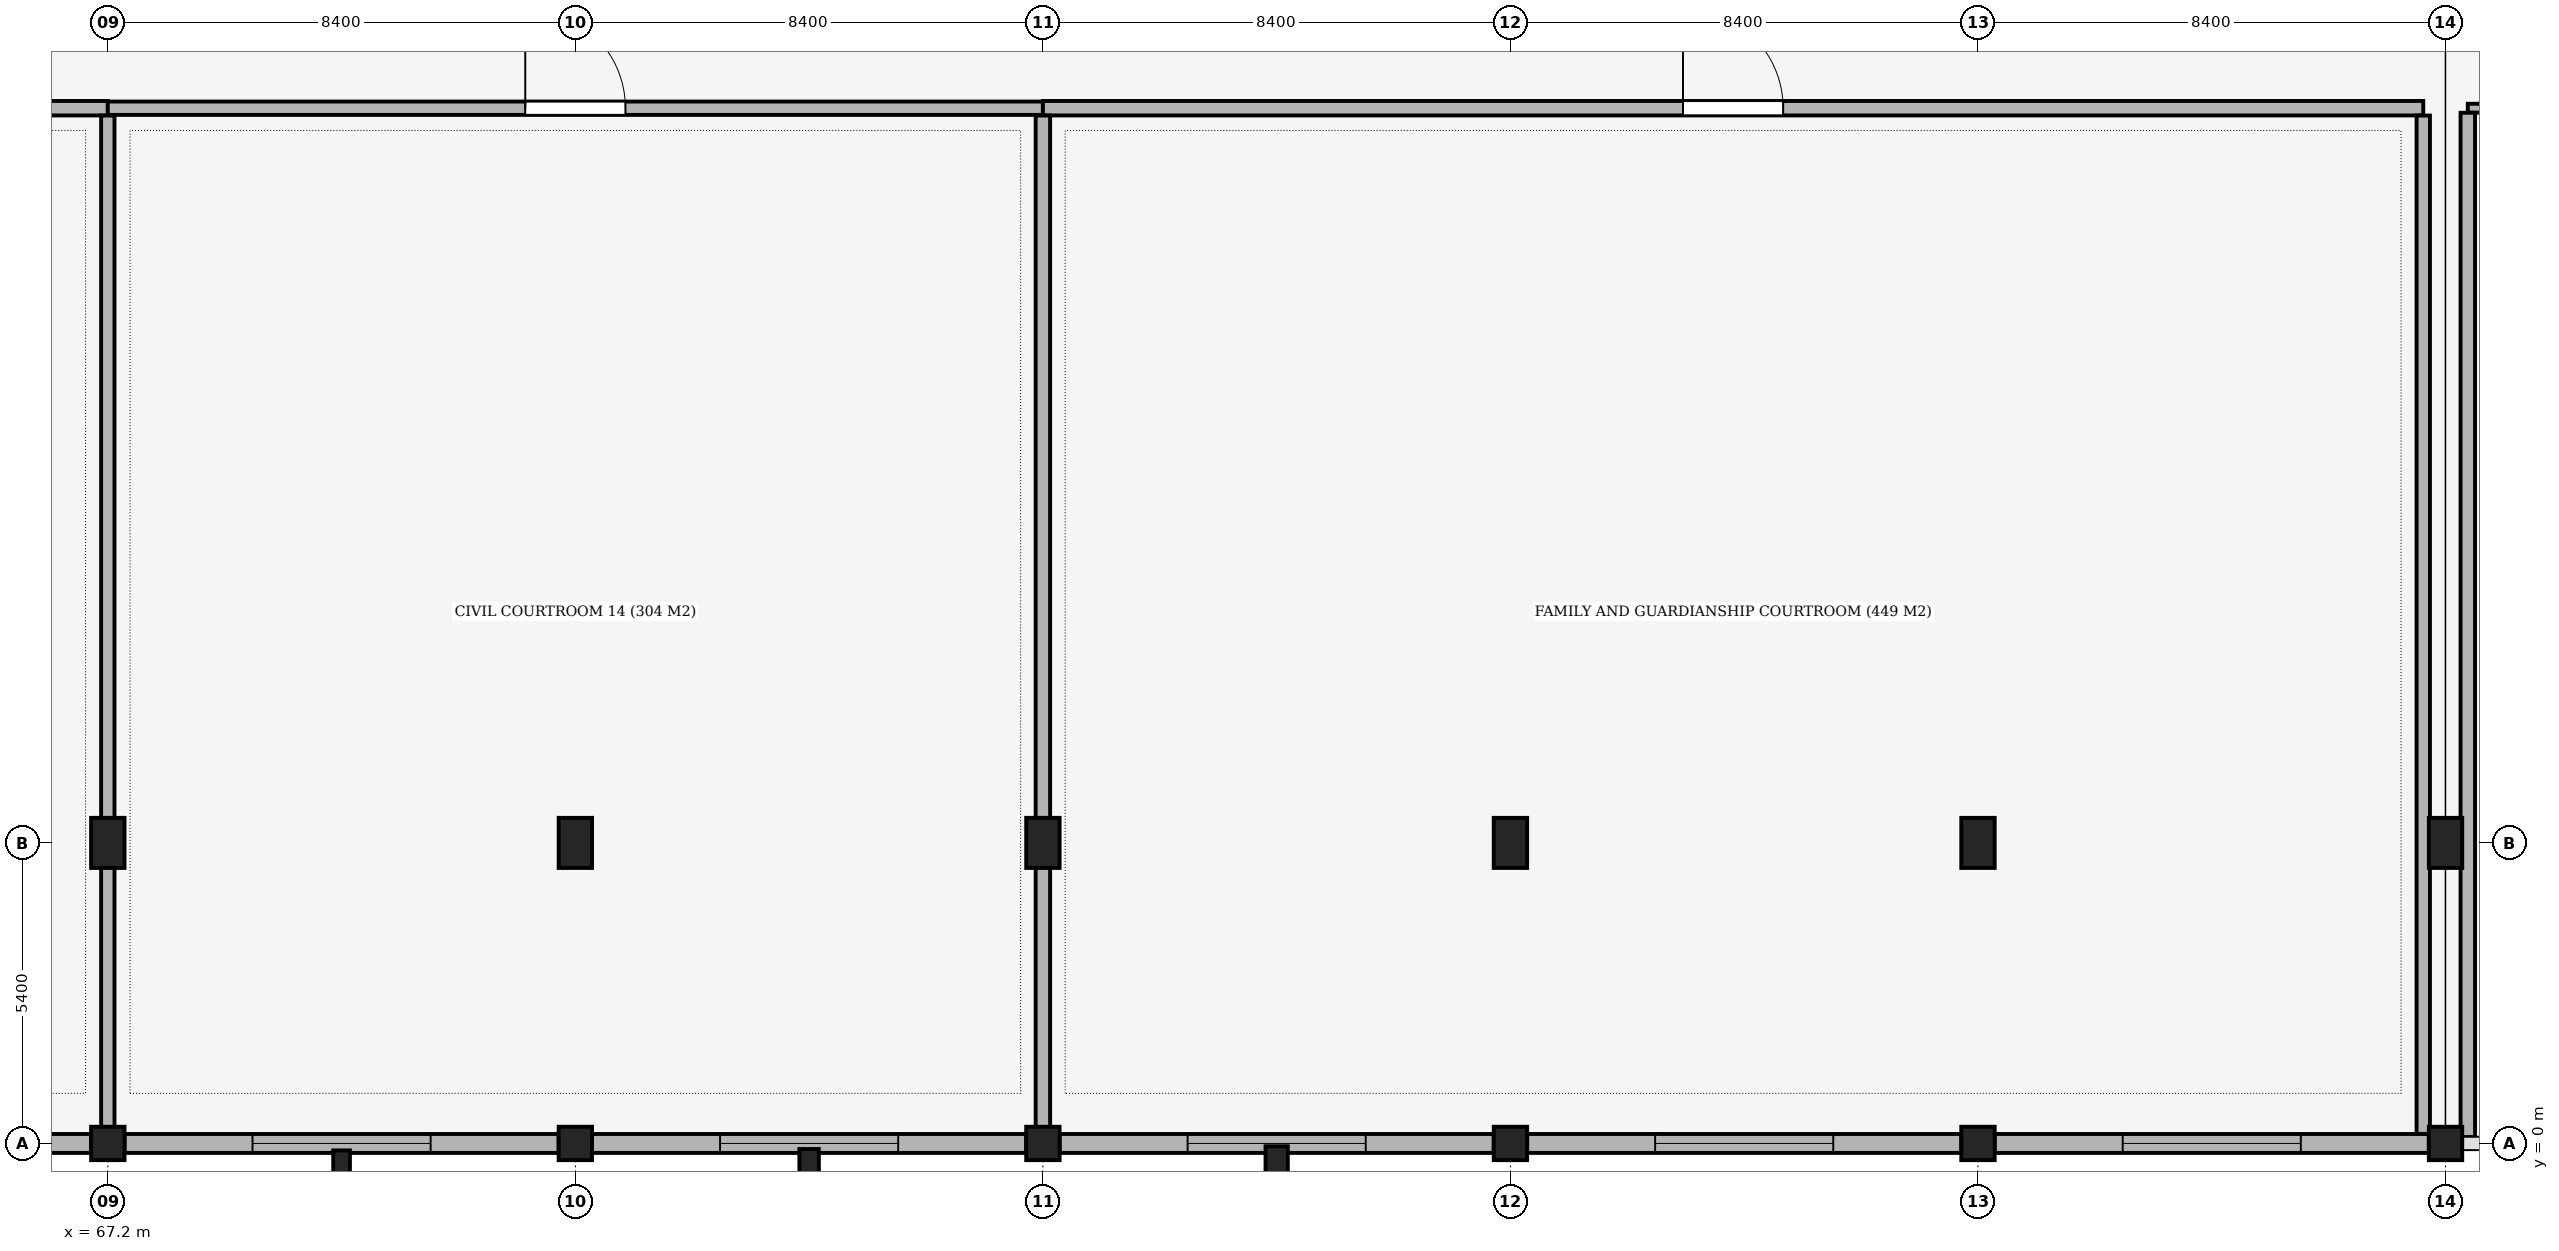
"""IFC4 building model, lengths in metres.
Left out: names, types, materials, properties, quantities, classifications, styles, units other than length and angle.
Written with IfcOpenShell. Run it as: python <this file> out.ifc"""

import sys

from ifc_helpers import new_model, si_unit, direction, frame, frame_2d, origin, origin_2d, place, context, subcontext, project, spatial, rectangle, extrude, element, fill, save


model = new_model("IFC4")
c1 = context("Model", 3, precision=1e-05, world=origin(), true_north=direction((0.0, 1.0)))
c2 = subcontext(c1, "Body", "Model", "MODEL_VIEW")
j1 = project(units=[si_unit("LENGTHUNIT", "METRE"), si_unit("PLANEANGLEUNIT", "RADIAN")], contexts=[c1])
p1 = place(None, origin())
s1 = spatial("IfcSite", under=j1, at=p1, CompositionType="ELEMENT")
p2 = place(p1, origin())
s2 = spatial("IfcBuilding", under=s1, at=p2, CompositionType="ELEMENT")
p3 = place(p2, frame((0.0, 0.0, 10.2)))
s3 = spatial("IfcBuildingStorey", under=s2, at=p3, CompositionType="ELEMENT", Elevation=10.2)
p4 = place(p3, frame((67.2, 0.0, 0.0), z_axis=(0.0, 0.0, 1.0), x_axis=(1.0, 0.0, 0.0)))
e1 = element("IfcColumn", 1, at=p4, inside=s3, PredefinedType="COLUMN", context=c2, shape_type="SweptSolid", body=[
    extrude(rectangle(XDim=0.6, YDim=0.6, at=origin_2d()), origin(), (0.0, 0.0, 1.0), 5.1),
])
p5 = place(p3, frame((67.2, 5.4, 0.0), z_axis=(0.0, 0.0, 1.0), x_axis=(1.0, 0.0, 0.0)))
e2 = element("IfcColumn", 2, at=p5, inside=s3, PredefinedType="COLUMN", context=c2, shape_type="SweptSolid", body=[
    extrude(rectangle(XDim=0.6, YDim=0.9, at=origin_2d()), origin(), (0.0, 0.0, 1.0), 5.1),
])
p6 = place(p3, frame((75.6, 0.0, 0.0), z_axis=(0.0, 0.0, 1.0), x_axis=(1.0, 0.0, 0.0)))
e3 = element("IfcColumn", 3, at=p6, inside=s3, PredefinedType="COLUMN", context=c2, shape_type="SweptSolid", body=[
    extrude(rectangle(XDim=0.6, YDim=0.6, at=origin_2d()), origin(), (0.0, 0.0, 1.0), 5.1),
])
p7 = place(p3, frame((75.6, 5.4, 0.0), z_axis=(0.0, 0.0, 1.0), x_axis=(1.0, 0.0, 0.0)))
e4 = element("IfcColumn", 4, at=p7, inside=s3, PredefinedType="COLUMN", context=c2, shape_type="SweptSolid", body=[
    extrude(rectangle(XDim=0.6, YDim=0.9, at=origin_2d()), origin(), (0.0, 0.0, 1.0), 5.1),
])
p8 = place(p3, frame((84.0, 0.0, 0.0), z_axis=(0.0, 0.0, 1.0), x_axis=(1.0, 0.0, 0.0)))
e5 = element("IfcColumn", 5, at=p8, inside=s3, PredefinedType="COLUMN", context=c2, shape_type="SweptSolid", body=[
    extrude(rectangle(XDim=0.6, YDim=0.6, at=origin_2d()), origin(), (0.0, 0.0, 1.0), 5.1),
])
p9 = place(p3, frame((84.0, 5.4, 0.0), z_axis=(0.0, 0.0, 1.0), x_axis=(1.0, 0.0, 0.0)))
e6 = element("IfcColumn", 6, at=p9, inside=s3, PredefinedType="COLUMN", context=c2, shape_type="SweptSolid", body=[
    extrude(rectangle(XDim=0.6, YDim=0.9, at=origin_2d()), origin(), (0.0, 0.0, 1.0), 5.1),
])
p10 = place(p3, frame((92.4, 0.0, 0.0), z_axis=(0.0, 0.0, 1.0), x_axis=(1.0, 0.0, 0.0)))
e7 = element("IfcColumn", 7, at=p10, inside=s3, PredefinedType="COLUMN", context=c2, shape_type="SweptSolid", body=[
    extrude(rectangle(XDim=0.6, YDim=0.6, at=origin_2d()), origin(), (0.0, 0.0, 1.0), 5.1),
])
p11 = place(p3, frame((92.4, 5.4, 0.0), z_axis=(0.0, 0.0, 1.0), x_axis=(1.0, 0.0, 0.0)))
e8 = element("IfcColumn", 8, at=p11, inside=s3, PredefinedType="COLUMN", context=c2, shape_type="SweptSolid", body=[
    extrude(rectangle(XDim=0.6, YDim=0.9, at=origin_2d()), origin(), (0.0, 0.0, 1.0), 5.1),
])
p12 = place(p3, frame((100.8, 0.0, 0.0), z_axis=(0.0, 0.0, 1.0), x_axis=(1.0, 0.0, 0.0)))
e9 = element("IfcColumn", 9, at=p12, inside=s3, PredefinedType="COLUMN", context=c2, shape_type="SweptSolid", body=[
    extrude(rectangle(XDim=0.6, YDim=0.6, at=origin_2d()), origin(), (0.0, 0.0, 1.0), 5.1),
])
p13 = place(p3, frame((100.8, 5.4, 0.0), z_axis=(0.0, 0.0, 1.0), x_axis=(1.0, 0.0, 0.0)))
e10 = element("IfcColumn", 10, at=p13, inside=s3, PredefinedType="COLUMN", context=c2, shape_type="SweptSolid", body=[
    extrude(rectangle(XDim=0.6, YDim=0.9, at=origin_2d()), origin(), (0.0, 0.0, 1.0), 5.1),
])
p14 = place(p3, frame((109.2, 0.0, 0.0), z_axis=(0.0, 0.0, 1.0), x_axis=(1.0, 0.0, 0.0)))
e11 = element("IfcColumn", 11, at=p14, inside=s3, PredefinedType="COLUMN", context=c2, shape_type="SweptSolid", body=[
    extrude(rectangle(XDim=0.6, YDim=0.6, at=origin_2d()), origin(), (0.0, 0.0, 1.0), 5.1),
])
p15 = place(p3, frame((109.2, 5.4, 0.0), z_axis=(0.0, 0.0, 1.0), x_axis=(1.0, 0.0, 0.0)))
e12 = element("IfcColumn", 12, at=p15, inside=s3, PredefinedType="COLUMN", context=c2, shape_type="SweptSolid", body=[
    extrude(rectangle(XDim=0.6, YDim=0.9, at=origin_2d()), origin(), (0.0, 0.0, 1.0), 5.1),
])
p16 = place(p3, frame((71.4, -0.35, 0.0), z_axis=(0.0, 0.0, 1.0), x_axis=(1.0, 0.0, 0.0)))
e13 = element("IfcColumn", 13, at=p16, inside=s3, PredefinedType="PILASTER", context=c2, shape_type="SweptSolid", body=[
    extrude(rectangle(XDim=0.3, YDim=0.45, at=origin_2d()), origin(), (0.0, 0.0, 1.0), 5.1),
])
p17 = place(p3, frame((79.8, -0.35, 0.0), z_axis=(0.0, 0.0, 1.0), x_axis=(1.0, 0.0, 0.0)))
e14 = element("IfcColumn", 14, at=p17, inside=s3, PredefinedType="PILASTER", context=c2, shape_type="SweptSolid", body=[
    extrude(rectangle(XDim=0.35, YDim=0.5, at=origin_2d()), origin(), (0.0, 0.0, 1.0), 5.1),
])
p18 = place(p3, frame((88.2, -0.35, 0.0), z_axis=(0.0, 0.0, 1.0), x_axis=(1.0, 0.0, 0.0)))
e15 = element("IfcColumn", 15, at=p18, inside=s3, PredefinedType="PILASTER", context=c2, shape_type="SweptSolid", body=[
    extrude(rectangle(XDim=0.4, YDim=0.6, at=origin_2d()), origin(), (0.0, 0.0, 1.0), 5.1),
])
p19 = place(p3, frame((108.9, 0.0, 0.0), z_axis=(0.0, 0.0, 1.0), x_axis=(-1.0, 0.0, 0.0)))
e16 = element("IfcWall", 16, at=p19, inside=s3, PredefinedType="SOLIDWALL", context=c2, shape_type="SweptSolid", body=[
    extrude(rectangle(XDim=7.8, YDim=0.34, at=frame_2d((3.9, 0.0))), origin(), (0.0, 0.0, 1.0), 4.12),
])
p20 = place(p19, frame((2.3, 0.0, 0.75)))
e17 = element("IfcOpeningElement", 17, at=p20, cuts=e16, PredefinedType="OPENING", context=c2, shape_type="SweptSolid", body=[
    extrude(rectangle(XDim=3.2, YDim=2.6, at=frame_2d((1.6, 1.3))), frame((0.0, 0.185, 0.0), z_axis=(0.0, -1.0, 0.0), x_axis=(1.0, 0.0, 0.0)), (0.0, 0.0, 1.0), 0.37),
])
p21 = place(p3, frame((100.5, 0.0, 0.0), z_axis=(0.0, 0.0, 1.0), x_axis=(-1.0, 0.0, 0.0)))
e18 = element("IfcWall", 18, at=p21, inside=s3, PredefinedType="SOLIDWALL", context=c2, shape_type="SweptSolid", body=[
    extrude(rectangle(XDim=7.8, YDim=0.34, at=frame_2d((3.9, 0.0))), origin(), (0.0, 0.0, 1.0), 4.12),
])
p22 = place(p21, frame((2.3, 0.0, 0.75)))
e19 = element("IfcOpeningElement", 19, at=p22, cuts=e18, PredefinedType="OPENING", context=c2, shape_type="SweptSolid", body=[
    extrude(rectangle(XDim=3.2, YDim=2.6, at=frame_2d((1.6, 1.3))), frame((0.0, 0.185, 0.0), z_axis=(0.0, -1.0, 0.0), x_axis=(1.0, 0.0, 0.0)), (0.0, 0.0, 1.0), 0.37),
])
p23 = place(p3, frame((92.1, 0.0, 0.0), z_axis=(0.0, 0.0, 1.0), x_axis=(-1.0, 0.0, 0.0)))
e20 = element("IfcWall", 20, at=p23, inside=s3, PredefinedType="SOLIDWALL", context=c2, shape_type="SweptSolid", body=[
    extrude(rectangle(XDim=7.8, YDim=0.34, at=frame_2d((3.9, 0.0))), origin(), (0.0, 0.0, 1.0), 4.12),
])
p24 = place(p23, frame((2.3, 0.0, 0.75)))
e21 = element("IfcOpeningElement", 21, at=p24, cuts=e20, PredefinedType="OPENING", context=c2, shape_type="SweptSolid", body=[
    extrude(rectangle(XDim=3.2, YDim=2.6, at=frame_2d((1.6, 1.3))), frame((0.0, 0.185, 0.0), z_axis=(0.0, -1.0, 0.0), x_axis=(1.0, 0.0, 0.0)), (0.0, 0.0, 1.0), 0.37),
])
p25 = place(p3, frame((83.7, 0.0, 0.0), z_axis=(0.0, 0.0, 1.0), x_axis=(-1.0, 0.0, 0.0)))
e22 = element("IfcWall", 22, at=p25, inside=s3, PredefinedType="SOLIDWALL", context=c2, shape_type="SweptSolid", body=[
    extrude(rectangle(XDim=7.8, YDim=0.34, at=frame_2d((3.9, 0.0))), origin(), (0.0, 0.0, 1.0), 4.12),
])
p26 = place(p25, frame((2.3, 0.0, 0.75)))
e23 = element("IfcOpeningElement", 23, at=p26, cuts=e22, PredefinedType="OPENING", context=c2, shape_type="SweptSolid", body=[
    extrude(rectangle(XDim=3.2, YDim=2.6, at=frame_2d((1.6, 1.3))), frame((0.0, 0.185, 0.0), z_axis=(0.0, -1.0, 0.0), x_axis=(1.0, 0.0, 0.0)), (0.0, 0.0, 1.0), 0.37),
])
p27 = place(p3, frame((75.3, 0.0, 0.0), z_axis=(0.0, 0.0, 1.0), x_axis=(-1.0, 0.0, 0.0)))
e24 = element("IfcWall", 24, at=p27, inside=s3, PredefinedType="SOLIDWALL", context=c2, shape_type="SweptSolid", body=[
    extrude(rectangle(XDim=7.8, YDim=0.34, at=frame_2d((3.9, 0.0))), origin(), (0.0, 0.0, 1.0), 4.12),
])
p28 = place(p27, frame((2.3, 0.0, 0.75)))
e25 = element("IfcOpeningElement", 25, at=p28, cuts=e24, PredefinedType="OPENING", context=c2, shape_type="SweptSolid", body=[
    extrude(rectangle(XDim=3.2, YDim=2.6, at=frame_2d((1.6, 1.3))), frame((0.0, 0.185, 0.0), z_axis=(0.0, -1.0, 0.0), x_axis=(1.0, 0.0, 0.0)), (0.0, 0.0, 1.0), 0.37),
])
p29 = place(p3, frame((66.9, 0.0, 0.0), z_axis=(0.0, 0.0, 1.0), x_axis=(-1.0, 0.0, 0.0)))
e26 = element("IfcWall", 26, at=p29, inside=s3, PredefinedType="SOLIDWALL", context=c2, shape_type="SweptSolid", body=[
    extrude(rectangle(XDim=7.8, YDim=0.34, at=frame_2d((3.9, 0.0))), origin(), (0.0, 0.0, 1.0), 4.12),
])
p30 = place(p29, frame((2.3, 0.0, 0.75)))
e27 = element("IfcOpeningElement", 27, at=p30, cuts=e26, PredefinedType="OPENING", context=c2, shape_type="SweptSolid", body=[
    extrude(rectangle(XDim=3.2, YDim=2.6, at=frame_2d((1.6, 1.3))), frame((0.0, 0.185, 0.0), z_axis=(0.0, -1.0, 0.0), x_axis=(1.0, 0.0, 0.0)), (0.0, 0.0, 1.0), 0.37),
])
p31 = place(p3, frame((50.4, 18.6, 0.0), z_axis=(0.0, 0.0, 1.0), x_axis=(1.0, 0.0, 0.0)))
e28 = element("IfcWall", 28, at=p31, inside=s3, PredefinedType="PARTITIONING", context=c2, shape_type="SweptSolid", body=[
    extrude(rectangle(XDim=16.8, YDim=0.26, at=frame_2d((8.4, 0.0))), origin(), (0.0, 0.0, 1.0), 3.77),
])
p32 = place(p31, frame((7.5, 0.0, 0.0)))
e29 = element("IfcOpeningElement", 29, at=p32, cuts=e28, PredefinedType="OPENING", context=c2, shape_type="SweptSolid", body=[
    extrude(rectangle(XDim=1.8, YDim=2.4, at=frame_2d((0.9, 1.2))), frame((0.0, 0.145, 0.0), z_axis=(0.0, -1.0, 0.0), x_axis=(1.0, 0.0, 0.0)), (0.0, 0.0, 1.0), 0.29),
])
p33 = place(p3, frame((67.2, 18.6, 0.0), z_axis=(0.0, 0.0, 1.0), x_axis=(1.0, 0.0, 0.0)))
e30 = element("IfcWall", 30, at=p33, inside=s3, PredefinedType="PARTITIONING", context=c2, shape_type="SweptSolid", body=[
    extrude(rectangle(XDim=16.8, YDim=0.24, at=frame_2d((8.4, 0.0))), origin(), (0.0, 0.0, 1.0), 3.77),
])
p34 = place(p33, frame((7.5, 0.0, 0.0)))
e31 = element("IfcOpeningElement", 31, at=p34, cuts=e30, PredefinedType="OPENING", context=c2, shape_type="SweptSolid", body=[
    extrude(rectangle(XDim=1.8, YDim=2.4, at=frame_2d((0.9, 1.2))), frame((0.0, 0.135, 0.0), z_axis=(0.0, -1.0, 0.0), x_axis=(1.0, 0.0, 0.0)), (0.0, 0.0, 1.0), 0.27),
])
p35 = place(p3, frame((84.0, 18.6, 0.0), z_axis=(0.0, 0.0, 1.0), x_axis=(1.0, 0.0, 0.0)))
e32 = element("IfcWall", 32, at=p35, inside=s3, PredefinedType="PARTITIONING", context=c2, shape_type="SweptSolid", body=[
    extrude(rectangle(XDim=24.8, YDim=0.26, at=frame_2d((12.4, 0.0))), origin(), (0.0, 0.0, 1.0), 3.77),
])
p36 = place(p35, frame((11.5, 0.0, 0.0)))
e33 = element("IfcOpeningElement", 33, at=p36, cuts=e32, PredefinedType="OPENING", context=c2, shape_type="SweptSolid", body=[
    extrude(rectangle(XDim=1.8, YDim=2.4, at=frame_2d((0.9, 1.2))), frame((0.0, 0.145, 0.0), z_axis=(0.0, -1.0, 0.0), x_axis=(1.0, 0.0, 0.0)), (0.0, 0.0, 1.0), 0.29),
])
p37 = place(p3, frame((109.6, 18.6, 0.0), z_axis=(0.0, 0.0, 1.0), x_axis=(1.0, 0.0, 0.0)))
e34 = element("IfcWall", 34, at=p37, inside=s3, PredefinedType="PARTITIONING", context=c2, shape_type="SweptSolid", body=[
    extrude(rectangle(XDim=8.0, YDim=0.16, at=frame_2d((4.0, 0.0))), origin(), (0.0, 0.0, 1.0), 3.77),
])
p38 = place(p37, frame((3.25, 0.0, 0.0)))
e35 = element("IfcOpeningElement", 35, at=p38, cuts=e34, PredefinedType="OPENING", context=c2, shape_type="SweptSolid", body=[
    extrude(rectangle(XDim=1.5, YDim=2.2, at=frame_2d((0.75, 1.1))), frame((0.0, 0.095, 0.0), z_axis=(0.0, -1.0, 0.0), x_axis=(1.0, 0.0, 0.0)), (0.0, 0.0, 1.0), 0.19),
])
p39 = place(p3, frame((67.2, -0.064, 0.0), z_axis=(0.0, 0.0, 1.0), x_axis=(0.0, 1.0, 0.0)))
e36 = element("IfcWall", 36, at=p39, inside=s3, PredefinedType="PARTITIONING", context=c2, shape_type="SweptSolid", body=[
    extrude(rectangle(XDim=18.532, YDim=0.24, at=frame_2d((9.266, 0.0))), origin(), (0.0, 0.0, 1.0), 3.77),
])
p40 = place(p3, frame((84.0, -0.064, 0.0), z_axis=(0.0, 0.0, 1.0), x_axis=(0.0, 1.0, 0.0)))
e37 = element("IfcWall", 37, at=p40, inside=s3, PredefinedType="PARTITIONING", context=c2, shape_type="SweptSolid", body=[
    extrude(rectangle(XDim=18.532, YDim=0.26, at=frame_2d((9.266, 0.0))), origin(), (0.0, 0.0, 1.0), 3.77),
])
p41 = place(p3, frame((108.8, 0.172, 0.0), z_axis=(0.0, 0.0, 1.0), x_axis=(0.0, 1.0, 0.0)))
e38 = element("IfcWall", 38, at=p41, inside=s3, PredefinedType="PARTITIONING", context=c2, shape_type="SweptSolid", body=[
    extrude(rectangle(XDim=18.296, YDim=0.24, at=frame_2d((9.148, 0.0))), origin(), (0.0, 0.0, 1.0), 3.77),
])
p42 = place(p3, frame((109.6, 0.115, 0.0), z_axis=(0.0, 0.0, 1.0), x_axis=(0.0, 1.0, 0.0)))
e39 = element("IfcWall", 39, at=p42, inside=s3, PredefinedType="PARTITIONING", context=c2, shape_type="SweptSolid", body=[
    extrude(rectangle(XDim=18.403, YDim=0.26, at=frame_2d((9.202, 0.0))), origin(), (0.0, 0.0, 1.0), 3.77),
])
p43 = place(p20, origin())
e40 = element("IfcWindow", 40, at=p43, inside=s3, PartitioningType="SINGLE_PANEL", PredefinedType="WINDOW", context=c2, shape_type="SweptSolid", body=[
    extrude(rectangle(XDim=3.2, YDim=2.6, at=frame_2d((1.6, 1.3))), frame((0.0, 0.03, 0.0), z_axis=(0.0, -1.0, 0.0), x_axis=(1.0, 0.0, 0.0)), (0.0, 0.0, 1.0), 0.06),
])
fill(e17, e40)
p44 = place(p22, origin())
e41 = element("IfcWindow", 41, at=p44, inside=s3, PartitioningType="SINGLE_PANEL", PredefinedType="WINDOW", context=c2, shape_type="SweptSolid", body=[
    extrude(rectangle(XDim=3.2, YDim=2.6, at=frame_2d((1.6, 1.3))), frame((0.0, 0.03, 0.0), z_axis=(0.0, -1.0, 0.0), x_axis=(1.0, 0.0, 0.0)), (0.0, 0.0, 1.0), 0.06),
])
fill(e19, e41)
p45 = place(p24, origin())
e42 = element("IfcWindow", 42, at=p45, inside=s3, PartitioningType="SINGLE_PANEL", PredefinedType="WINDOW", context=c2, shape_type="SweptSolid", body=[
    extrude(rectangle(XDim=3.2, YDim=2.6, at=frame_2d((1.6, 1.3))), frame((0.0, 0.03, 0.0), z_axis=(0.0, -1.0, 0.0), x_axis=(1.0, 0.0, 0.0)), (0.0, 0.0, 1.0), 0.06),
])
fill(e21, e42)
p46 = place(p26, origin())
e43 = element("IfcWindow", 43, at=p46, inside=s3, PartitioningType="SINGLE_PANEL", PredefinedType="WINDOW", context=c2, shape_type="SweptSolid", body=[
    extrude(rectangle(XDim=3.2, YDim=2.6, at=frame_2d((1.6, 1.3))), frame((0.0, 0.03, 0.0), z_axis=(0.0, -1.0, 0.0), x_axis=(1.0, 0.0, 0.0)), (0.0, 0.0, 1.0), 0.06),
])
fill(e23, e43)
p47 = place(p28, origin())
e44 = element("IfcWindow", 44, at=p47, inside=s3, PartitioningType="SINGLE_PANEL", PredefinedType="WINDOW", context=c2, shape_type="SweptSolid", body=[
    extrude(rectangle(XDim=3.2, YDim=2.6, at=frame_2d((1.6, 1.3))), frame((0.0, 0.03, 0.0), z_axis=(0.0, -1.0, 0.0), x_axis=(1.0, 0.0, 0.0)), (0.0, 0.0, 1.0), 0.06),
])
fill(e25, e44)
p48 = place(p34, origin())
e45 = element("IfcDoor", 45, at=p48, inside=s3, OperationType="SINGLE_SWING_LEFT", PredefinedType="DOOR", context=c2, shape_type="SweptSolid", body=[
    extrude(rectangle(XDim=1.8, YDim=2.4, at=frame_2d((0.9, 1.2))), frame((0.0, 0.025, 0.0), z_axis=(0.0, -1.0, 0.0), x_axis=(1.0, 0.0, 0.0)), (0.0, 0.0, 1.0), 0.05),
])
fill(e31, e45)
p49 = place(p36, origin())
e46 = element("IfcDoor", 46, at=p49, inside=s3, OperationType="SINGLE_SWING_LEFT", PredefinedType="DOOR", context=c2, shape_type="SweptSolid", body=[
    extrude(rectangle(XDim=1.8, YDim=2.4, at=frame_2d((0.9, 1.2))), frame((0.0, 0.025, 0.0), z_axis=(0.0, -1.0, 0.0), x_axis=(1.0, 0.0, 0.0)), (0.0, 0.0, 1.0), 0.05),
])
fill(e33, e46)
save(model, sys.argv[1])
